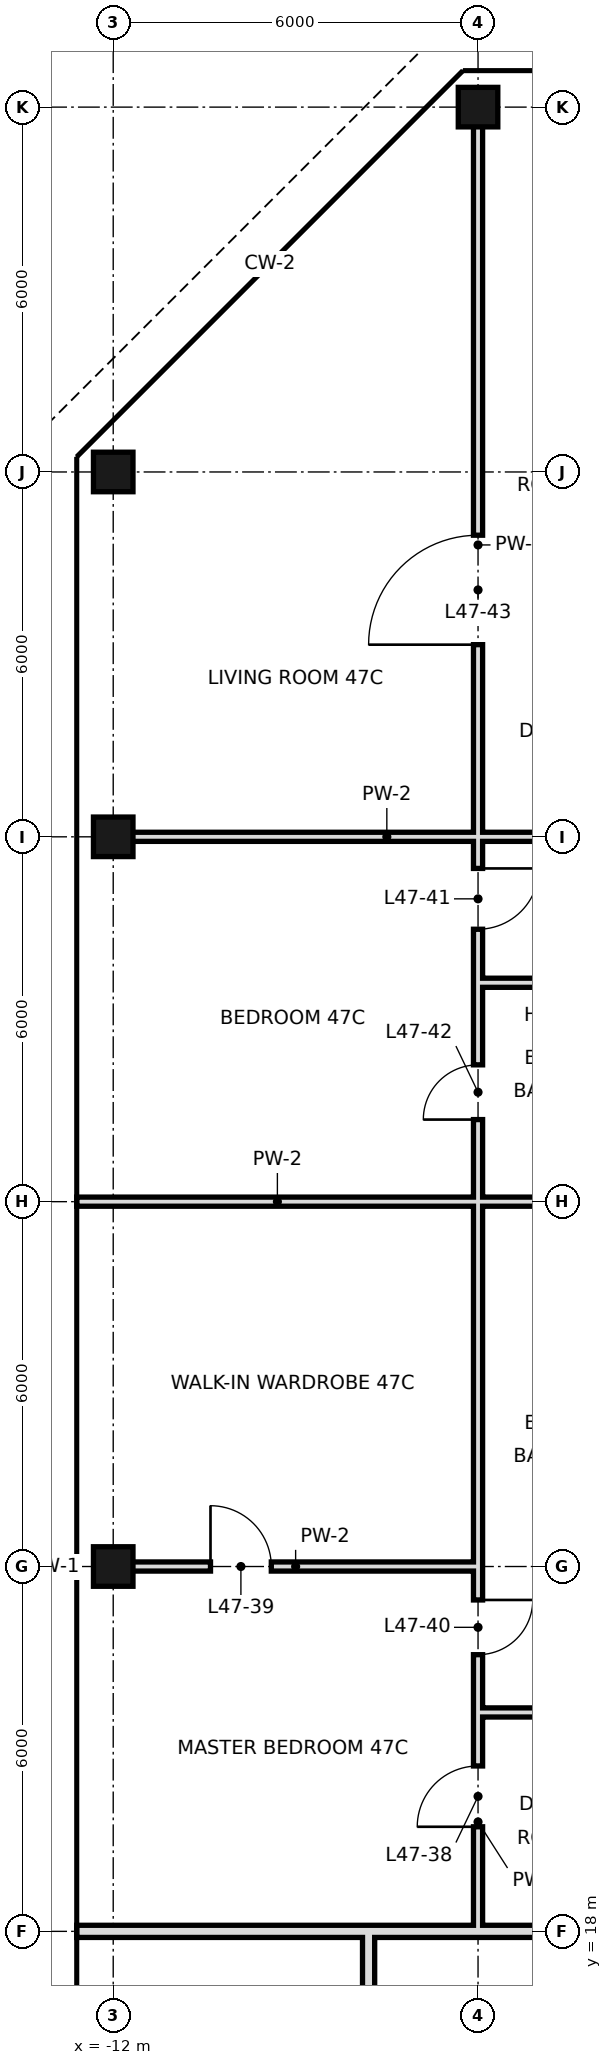
"""IFC4 building model, lengths in metres.
Left out: names, types, materials, properties, quantities, classifications, styles, units other than length and angle.
Written with IfcOpenShell. Run it as: python <this file> out.ifc"""

import sys

from ifc_helpers import new_model, si_unit, direction, frame, frame_2d, origin, origin_2d, place, context, subcontext, project, spatial, rectangle, hollow_rectangle, extrude, element, fill, save


model = new_model("IFC4")
c1 = context("Model", 3, precision=1e-05, world=origin(), true_north=direction((0.0, 1.0)))
c2 = subcontext(c1, "Body", "Model", "MODEL_VIEW")
j1 = project(units=[si_unit("LENGTHUNIT", "METRE"), si_unit("PLANEANGLEUNIT", "RADIAN")], contexts=[c1])
p1 = place(None, origin())
s1 = spatial("IfcSite", under=j1, at=p1, CompositionType="ELEMENT")
p2 = place(p1, origin())
s2 = spatial("IfcBuilding", under=s1, at=p2, CompositionType="ELEMENT")
p3 = place(p2, frame((0.0, 0.0, 202.8)))
s3 = spatial("IfcBuildingStorey", under=s2, at=p3, CompositionType="ELEMENT", Elevation=202.8)
for number, where, z_axis, x_axis in (
    (1, (-12.0, 24.0, 0.0), (0.0, 0.0, 1.0), (1.0, 0.0, 0.0)),
    (2, (-12.0, 36.0, 0.0), (0.0, 0.0, 1.0), (1.0, 0.0, 0.0)),
    (3, (-12.0, 42.0, 0.0), (0.0, 0.0, 1.0), (1.0, 0.0, 0.0)),
    (4, (-6.0, 48.0, 0.0), (0.0, 0.0, 1.0), (1.0, 0.0, 0.0)),
):
    element("IfcColumn", number, at=place(p3, frame(where, z_axis=z_axis, x_axis=x_axis)), inside=s3, PredefinedType="COLUMN", context=c2, shape_type="SweptSolid", body=[
        extrude(hollow_rectangle(XDim=0.65, YDim=0.65, WallThickness=0.032, at=origin_2d()), origin(), (0.0, 0.0, 1.0), 3.6),
    ])
p4 = place(p3, frame((-6.0, 18.0, 0.0), z_axis=(0.0, 0.0, 1.0), x_axis=(0.0, 1.0, 0.0)))
e5 = element("IfcWall", 5, at=p4, inside=s3, PredefinedType="PARTITIONING", context=c2, shape_type="SweptSolid", body=[
    extrude(rectangle(XDim=3.6, YDim=0.15, at=frame_2d((1.8, 0.0))), origin(), (0.0, 0.0, 1.0), 3.42),
])
p5 = place(p4, frame((1.72, 0.0, 0.0)))
e6 = element("IfcOpeningElement", 6, at=p5, cuts=e5, PredefinedType="OPENING", context=c2, shape_type="SweptSolid", body=[
    extrude(rectangle(XDim=1.0, YDim=2.4, at=frame_2d((0.5, 1.2))), frame((0.0, 0.085, 0.0), z_axis=(0.0, -1.0, 0.0), x_axis=(1.0, 0.0, 0.0)), (0.0, 0.0, 1.0), 0.17),
])
p6 = place(p3, frame((-6.0, 33.6, 0.0), z_axis=(0.0, 0.0, 1.0), x_axis=(0.0, 1.0, 0.0)))
e7 = element("IfcWall", 7, at=p6, inside=s3, PredefinedType="PARTITIONING", context=c2, shape_type="SweptSolid", body=[
    extrude(rectangle(XDim=14.4, YDim=0.15, at=frame_2d((7.2, 0.0))), origin(), (0.0, 0.0, 1.0), 3.42),
])
p7 = place(p6, frame((0.88, 0.0, 0.0)))
e8 = element("IfcOpeningElement", 8, at=p7, cuts=e7, PredefinedType="OPENING", context=c2, shape_type="SweptSolid", body=[
    extrude(rectangle(XDim=1.0, YDim=2.4, at=frame_2d((0.5, 1.2))), frame((0.0, 0.085, 0.0), z_axis=(0.0, -1.0, 0.0), x_axis=(1.0, 0.0, 0.0)), (0.0, 0.0, 1.0), 0.17),
])
p8 = place(p6, frame((5.56, 0.0, 0.0)))
e9 = element("IfcOpeningElement", 9, at=p8, cuts=e7, PredefinedType="OPENING", context=c2, shape_type="SweptSolid", body=[
    extrude(rectangle(XDim=1.8, YDim=2.4, at=frame_2d((0.9, 1.2))), frame((0.0, 0.085, 0.0), z_axis=(0.0, -1.0, 0.0), x_axis=(1.0, 0.0, 0.0)), (0.0, 0.0, 1.0), 0.17),
])
p9 = place(p3, frame((-6.0, 21.6, 0.0), z_axis=(0.0, 0.0, 1.0), x_axis=(0.0, 1.0, 0.0)))
e10 = element("IfcWall", 10, at=p9, inside=s3, PredefinedType="PARTITIONING", context=c2, shape_type="SweptSolid", body=[
    extrude(rectangle(XDim=12.0, YDim=0.15, at=frame_2d((6.0, 0.0))), origin(), (0.0, 0.0, 1.0), 3.42),
])
p10 = place(p9, frame((0.95, 0.0, 0.0)))
e11 = element("IfcOpeningElement", 11, at=p10, cuts=e10, PredefinedType="OPENING", context=c2, shape_type="SweptSolid", body=[
    extrude(rectangle(XDim=0.9, YDim=2.4, at=frame_2d((0.45, 1.2))), frame((0.0, 0.085, 0.0), z_axis=(0.0, -1.0, 0.0), x_axis=(1.0, 0.0, 0.0)), (0.0, 0.0, 1.0), 0.17),
])
p11 = place(p9, frame((9.75, 0.0, 0.0)))
e12 = element("IfcOpeningElement", 12, at=p11, cuts=e10, PredefinedType="OPENING", context=c2, shape_type="SweptSolid", body=[
    extrude(rectangle(XDim=0.9, YDim=2.4, at=frame_2d((0.45, 1.2))), frame((0.0, 0.085, 0.0), z_axis=(0.0, -1.0, 0.0), x_axis=(1.0, 0.0, 0.0)), (0.0, 0.0, 1.0), 0.17),
])
p12 = place(p3, frame((-7.8, 10.8, 0.0), z_axis=(0.0, 0.0, 1.0), x_axis=(0.0, 1.0, 0.0)))
e13 = element("IfcWall", 13, at=p12, inside=s3, PredefinedType="SOLIDWALL", context=c2, shape_type="SweptSolid", body=[
    extrude(rectangle(XDim=7.2, YDim=0.2, at=frame_2d((3.6, 0.0))), origin(), (0.0, 0.0, 1.0), 2.72),
])
p13 = place(p3, frame((-12.6, 18.0, 0.0), z_axis=(0.0, 0.0, 1.0), x_axis=(1.0, 0.0, 0.0)))
e14 = element("IfcWall", 14, at=p13, inside=s3, PredefinedType="SOLIDWALL", context=c2, shape_type="SweptSolid", body=[
    extrude(rectangle(XDim=4.8, YDim=0.2, at=frame_2d((2.4, 0.0))), origin(), (0.0, 0.0, 1.0), 2.72),
])
p14 = place(p3, frame((-7.8, 18.0, 0.0), z_axis=(0.0, 0.0, 1.0), x_axis=(1.0, 0.0, 0.0)))
e15 = element("IfcWall", 15, at=p14, inside=s3, PredefinedType="SOLIDWALL", context=c2, shape_type="SweptSolid", body=[
    extrude(rectangle(XDim=10.9, YDim=0.2, at=frame_2d((5.45, 0.0))), origin(), (0.0, 0.0, 1.0), 2.72),
])
p15 = place(p3, frame((-6.0, 21.6, 0.0), z_axis=(0.0, 0.0, 1.0), x_axis=(1.0, 0.0, 0.0)))
e16 = element("IfcWall", 16, at=p15, inside=s3, PredefinedType="PARTITIONING", context=c2, shape_type="SweptSolid", body=[
    extrude(rectangle(XDim=3.0, YDim=0.15, at=frame_2d((1.5, 0.0))), origin(), (0.0, 0.0, 1.0), 3.42),
])
p16 = place(p3, frame((-12.0, 24.0, 0.0), z_axis=(0.0, 0.0, 1.0), x_axis=(1.0, 0.0, 0.0)))
e17 = element("IfcWall", 17, at=p16, inside=s3, PredefinedType="PARTITIONING", context=c2, shape_type="SweptSolid", body=[
    extrude(rectangle(XDim=6.0, YDim=0.15, at=frame_2d((3.0, 0.0))), origin(), (0.0, 0.0, 1.0), 2.72),
])
p17 = place(p16, frame((1.6, 0.0, 0.0)))
e18 = element("IfcOpeningElement", 18, at=p17, cuts=e17, PredefinedType="OPENING", context=c2, shape_type="SweptSolid", body=[
    extrude(rectangle(XDim=1.0, YDim=2.4, at=frame_2d((0.5, 1.2))), frame((0.0, 0.085, 0.0), z_axis=(0.0, -1.0, 0.0), x_axis=(1.0, 0.0, 0.0)), (0.0, 0.0, 1.0), 0.17),
])
p18 = place(p3, frame((-12.6, 30.0, 0.0), z_axis=(0.0, 0.0, 1.0), x_axis=(1.0, 0.0, 0.0)))
e19 = element("IfcWall", 19, at=p18, inside=s3, PredefinedType="PARTITIONING", context=c2, shape_type="SweptSolid", body=[
    extrude(rectangle(XDim=6.6, YDim=0.15, at=frame_2d((3.3, 0.0))), origin(), (0.0, 0.0, 1.0), 2.72),
])
p19 = place(p3, frame((-6.0, 30.0, 0.0), z_axis=(0.0, 0.0, 1.0), x_axis=(1.0, 0.0, 0.0)))
e20 = element("IfcWall", 20, at=p19, inside=s3, PredefinedType="PARTITIONING", context=c2, shape_type="SweptSolid", body=[
    extrude(rectangle(XDim=3.0, YDim=0.15, at=frame_2d((1.5, 0.0))), origin(), (0.0, 0.0, 1.0), 2.72),
])
p20 = place(p3, frame((-6.0, 33.6, 0.0), z_axis=(0.0, 0.0, 1.0), x_axis=(1.0, 0.0, 0.0)))
e21 = element("IfcWall", 21, at=p20, inside=s3, PredefinedType="PARTITIONING", context=c2, shape_type="SweptSolid", body=[
    extrude(rectangle(XDim=3.0, YDim=0.15, at=frame_2d((1.5, 0.0))), origin(), (0.0, 0.0, 1.0), 3.42),
])
p21 = place(p3, frame((-12.0, 36.0, 0.0), z_axis=(0.0, 0.0, 1.0), x_axis=(1.0, 0.0, 0.0)))
e22 = element("IfcWall", 22, at=p21, inside=s3, PredefinedType="PARTITIONING", context=c2, shape_type="SweptSolid", body=[
    extrude(rectangle(XDim=9.0, YDim=0.15, at=frame_2d((4.5, 0.0))), origin(), (0.0, 0.0, 1.0), 2.72),
])
p22 = place(p5, origin())
e23 = element("IfcDoor", 23, at=p22, inside=s3, OperationType="SINGLE_SWING_LEFT", PredefinedType="DOOR", context=c2, shape_type="SweptSolid", body=[
    extrude(rectangle(XDim=1.0, YDim=2.4, at=frame_2d((0.5, 1.2))), frame((0.0, 0.025, 0.0), z_axis=(0.0, -1.0, 0.0), x_axis=(1.0, 0.0, 0.0)), (0.0, 0.0, 1.0), 0.05),
])
fill(e6, e23)
p23 = place(p17, origin())
e24 = element("IfcDoor", 24, at=p23, inside=s3, OperationType="SINGLE_SWING_LEFT", PredefinedType="DOOR", context=c2, shape_type="SweptSolid", body=[
    extrude(rectangle(XDim=1.0, YDim=2.4, at=frame_2d((0.5, 1.2))), frame((0.0, 0.025, 0.0), z_axis=(0.0, -1.0, 0.0), x_axis=(1.0, 0.0, 0.0)), (0.0, 0.0, 1.0), 0.05),
])
fill(e18, e24)
p24 = place(p10, origin())
e25 = element("IfcDoor", 25, at=p24, inside=s3, OperationType="SINGLE_SWING_RIGHT", PredefinedType="DOOR", context=c2, shape_type="SweptSolid", body=[
    extrude(rectangle(XDim=0.9, YDim=2.4, at=frame_2d((0.45, 1.2))), frame((0.0, 0.025, 0.0), z_axis=(0.0, -1.0, 0.0), x_axis=(1.0, 0.0, 0.0)), (0.0, 0.0, 1.0), 0.05),
])
fill(e11, e25)
p25 = place(p7, origin())
e26 = element("IfcDoor", 26, at=p25, inside=s3, OperationType="SINGLE_SWING_RIGHT", PredefinedType="DOOR", context=c2, shape_type="SweptSolid", body=[
    extrude(rectangle(XDim=1.0, YDim=2.4, at=frame_2d((0.5, 1.2))), frame((0.0, 0.025, 0.0), z_axis=(0.0, -1.0, 0.0), x_axis=(1.0, 0.0, 0.0)), (0.0, 0.0, 1.0), 0.05),
])
fill(e8, e26)
p26 = place(p11, origin())
e27 = element("IfcDoor", 27, at=p26, inside=s3, OperationType="SINGLE_SWING_LEFT", PredefinedType="DOOR", context=c2, shape_type="SweptSolid", body=[
    extrude(rectangle(XDim=0.9, YDim=2.4, at=frame_2d((0.45, 1.2))), frame((0.0, 0.025, 0.0), z_axis=(0.0, -1.0, 0.0), x_axis=(1.0, 0.0, 0.0)), (0.0, 0.0, 1.0), 0.05),
])
fill(e12, e27)
p27 = place(p8, origin())
e28 = element("IfcDoor", 28, at=p27, inside=s3, OperationType="SINGLE_SWING_LEFT", PredefinedType="DOOR", context=c2, shape_type="SweptSolid", body=[
    extrude(rectangle(XDim=1.8, YDim=2.4, at=frame_2d((0.9, 1.2))), frame((0.0, 0.025, 0.0), z_axis=(0.0, -1.0, 0.0), x_axis=(1.0, 0.0, 0.0)), (0.0, 0.0, 1.0), 0.05),
])
fill(e9, e28)
save(model, sys.argv[1])
